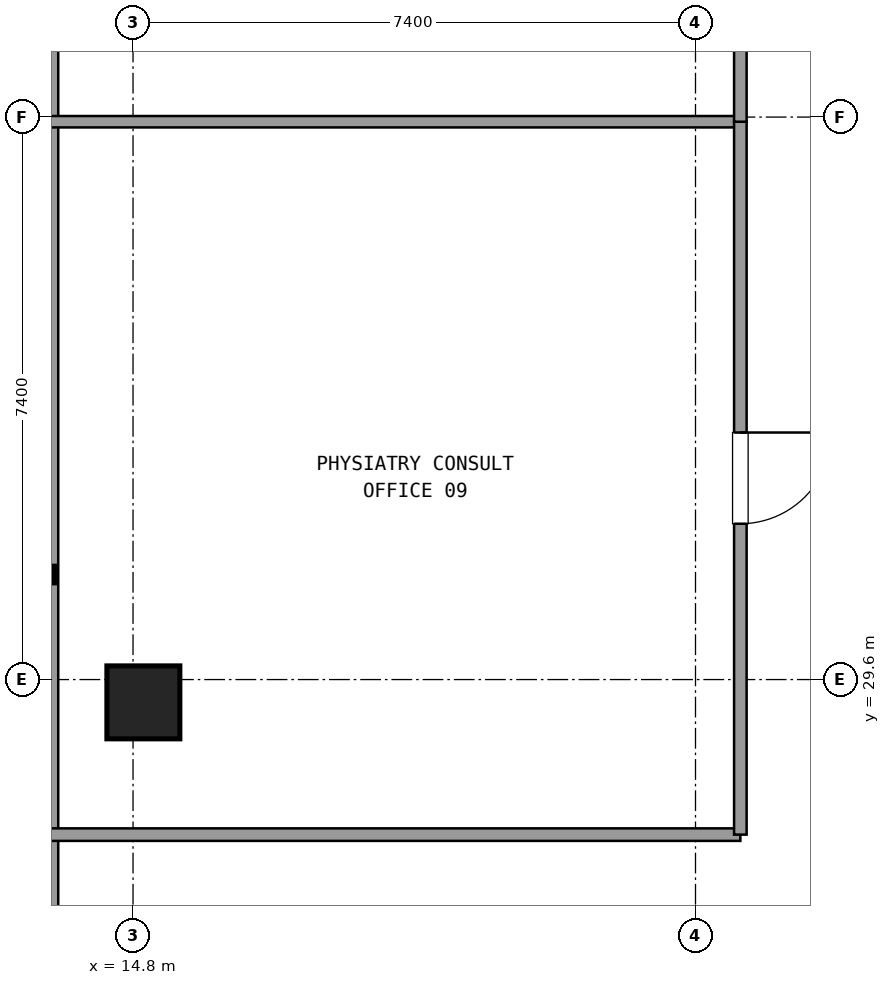
"""IFC4 building model, lengths in metres.
Left out: names, types, materials, properties, quantities, classifications, styles, units other than length and angle.
Written with IfcOpenShell. Run it as: python <this file> out.ifc"""

import sys

from ifc_helpers import new_model, si_unit, direction, frame, frame_2d, origin, origin_2d, place, context, subcontext, project, spatial, rectangle, extrude, element, fill, save


model = new_model("IFC4")
c1 = context("Model", 3, precision=1e-05, world=origin(), true_north=direction((0.0, 1.0)))
c2 = subcontext(c1, "Body", "Model", "MODEL_VIEW")
j1 = project(units=[si_unit("LENGTHUNIT", "METRE"), si_unit("PLANEANGLEUNIT", "RADIAN")], contexts=[c1])
p1 = place(None, origin())
s1 = spatial("IfcSite", under=j1, at=p1, CompositionType="ELEMENT")
p2 = place(p1, origin())
s2 = spatial("IfcBuilding", under=s1, at=p2, CompositionType="ELEMENT")
p3 = place(p2, frame((0.0, 0.0, 167.22)))
s3 = spatial("IfcBuildingStorey", under=s2, at=p3, CompositionType="ELEMENT", Elevation=167.22)
p4 = place(p3, frame((14.936, 29.3, 0.0), z_axis=(0.0, 0.0, 1.0), x_axis=(1.0, 0.0, 0.0)))
e1 = element("IfcColumn", 1, at=p4, inside=s3, PredefinedType="COLUMN", context=c2, shape_type="SweptSolid", body=[
    extrude(rectangle(XDim=0.96, YDim=0.96, at=origin_2d()), origin(), (0.0, 0.0, 1.0), 3.6),
])
p5 = place(p3, frame((13.696, 41.145, 0.0), z_axis=(0.0, 0.0, 1.0), x_axis=(0.0, -1.0, 0.0)))
e2 = element("IfcWall", 2, at=p5, inside=s3, PredefinedType="SOLIDWALL", context=c2, shape_type="SweptSolid", body=[
    extrude(rectangle(XDim=30.49, YDim=0.24, at=frame_2d((15.245, 0.0))), origin(), (0.0, 0.0, 1.0), 0.85),
])
p6 = place(p3, frame((13.716, 27.56, 0.0), z_axis=(0.0, 0.0, 1.0), x_axis=(1.0, 0.0, 0.0)))
e3 = element("IfcWall", 3, at=p6, inside=s3, PredefinedType="PARTITIONING", context=c2, shape_type="SweptSolid", body=[
    extrude(rectangle(XDim=9.074, YDim=0.165, at=frame_2d((4.537, 0.0))), origin(), (0.0, 0.0, 1.0), 2.61),
])
p7 = place(p3, frame((22.79, 36.939, 0.0), z_axis=(0.0, 0.0, 1.0), x_axis=(-1.0, 0.0, 0.0)))
e4 = element("IfcWall", 4, at=p7, inside=s3, PredefinedType="PARTITIONING", context=c2, shape_type="SweptSolid", body=[
    extrude(rectangle(XDim=9.074, YDim=0.15, at=frame_2d((4.537, 0.0))), origin(), (0.0, 0.0, 1.0), 2.61),
])
p8 = place(p3, frame((22.79, 27.56, 0.0), z_axis=(0.0, 0.0, 1.0), x_axis=(0.0, 1.0, 0.0)))
e5 = element("IfcWall", 5, at=p8, inside=s3, PredefinedType="PARTITIONING", context=c2, shape_type="SweptSolid", body=[
    extrude(rectangle(XDim=9.379, YDim=0.165, at=frame_2d((4.689, 0.0))), origin(), (0.0, 0.0, 1.0), 2.61),
])
p9 = place(p8, frame((4.09, 0.0, 0.0)))
e6 = element("IfcOpeningElement", 6, at=p9, cuts=e5, PredefinedType="OPENING", context=c2, shape_type="SweptSolid", body=[
    extrude(rectangle(XDim=1.2, YDim=2.15, at=frame_2d((0.6, 1.075))), frame((0.0, 0.093, 0.0), z_axis=(0.0, -1.0, 0.0), x_axis=(1.0, 0.0, 0.0)), (0.0, 0.0, 1.0), 0.185),
])
p10 = place(p3, frame((22.79, 36.939, 0.0), z_axis=(0.0, 0.0, 1.0), x_axis=(0.0, 1.0, 0.0)))
e7 = element("IfcWall", 7, at=p10, inside=s3, PredefinedType="PARTITIONING", context=c2, shape_type="SweptSolid", body=[
    extrude(rectangle(XDim=10.161, YDim=0.165, at=frame_2d((5.081, 0.0))), origin(), (0.0, 0.0, 1.0), 2.61),
])
p11 = place(p10, frame((4.481, 0.0, 0.0)))
e8 = element("IfcOpeningElement", 8, at=p11, cuts=e7, PredefinedType="OPENING", context=c2, shape_type="SweptSolid", body=[
    extrude(rectangle(XDim=1.2, YDim=2.15, at=frame_2d((0.6, 1.075))), frame((0.0, 0.093, 0.0), z_axis=(0.0, -1.0, 0.0), x_axis=(1.0, 0.0, 0.0)), (0.0, 0.0, 1.0), 0.185),
])
p12 = place(p9, frame((1.2, 0.0, 0.0), z_axis=(0.0, 0.0, 1.0), x_axis=(-1.0, 0.0, 0.0)))
e9 = element("IfcDoor", 9, at=p12, inside=s3, OperationType="SINGLE_SWING_RIGHT", PredefinedType="DOOR", context=c2, shape_type="SweptSolid", body=[
    extrude(rectangle(XDim=1.2, YDim=2.15, at=frame_2d((0.6, 1.075))), frame((0.0, 0.025, 0.0), z_axis=(0.0, -1.0, 0.0), x_axis=(1.0, 0.0, 0.0)), (0.0, 0.0, 1.0), 0.05),
])
fill(e6, e9)
save(model, sys.argv[1])
